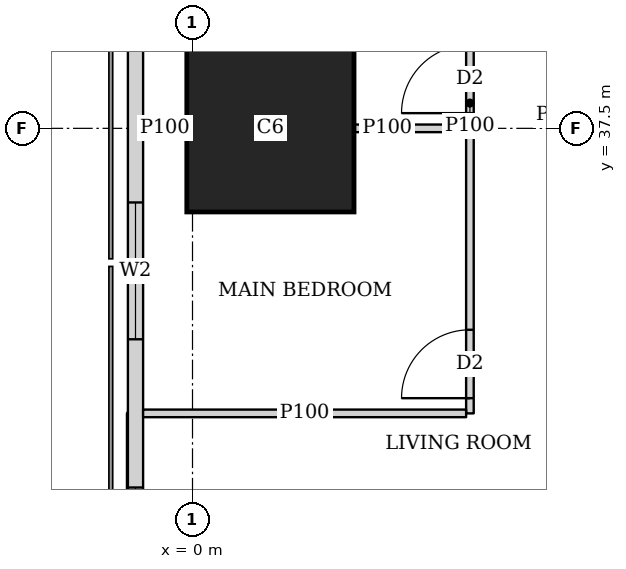
"""IFC4 building model, lengths in metres.
Left out: names, types, materials, properties, quantities, classifications, styles, units other than length and angle.
Written with IfcOpenShell. Run it as: python <this file> out.ifc"""

import sys

from ifc_helpers import new_model, si_unit, direction, frame, frame_2d, origin, origin_2d, place, context, subcontext, project, spatial, rectangle, extrude, element, fill, save


model = new_model("IFC4")
c1 = context("Model", 3, precision=1e-05, world=origin(), true_north=direction((0.0, 1.0)))
c2 = subcontext(c1, "Body", "Model", "MODEL_VIEW")
j1 = project(units=[si_unit("LENGTHUNIT", "METRE"), si_unit("PLANEANGLEUNIT", "RADIAN")], contexts=[c1])
p1 = place(None, origin())
s1 = spatial("IfcSite", under=j1, at=p1, CompositionType="ELEMENT")
p2 = place(p1, origin())
s2 = spatial("IfcBuilding", under=s1, at=p2, CompositionType="ELEMENT")
p3 = place(p2, frame((0.0, 0.0, 126.65)))
s3 = spatial("IfcBuildingStorey", under=s2, at=p3, CompositionType="ELEMENT", Elevation=126.65)
p4 = place(p3, frame((1.025, 37.5, 0.0), z_axis=(0.0, 0.0, 1.0), x_axis=(1.0, 0.0, 0.0)))
e1 = element("IfcColumn", 1, at=p4, inside=s3, PredefinedType="COLUMN", context=c2, shape_type="SweptSolid", body=[
    extrude(rectangle(XDim=2.2, YDim=2.2, at=origin_2d()), origin(), (0.0, 0.0, 1.0), 3.75),
])
p5 = place(p3, frame((-0.75, 42.837, 0.0), z_axis=(0.0, 0.0, 1.0), x_axis=(0.0, -1.0, 0.0)))
e2 = element("IfcWall", 2, at=p5, inside=s3, PredefinedType="SOLIDWALL", context=c2, shape_type="SweptSolid", body=[
    extrude(rectangle(XDim=40.674, YDim=0.2, at=frame_2d((20.337, 0.0))), origin(), (0.0, 0.0, 1.0), 3.45),
])
p6 = place(p5, frame((1.78, 0.0, 0.9)))
e3 = element("IfcOpeningElement", 3, at=p6, cuts=e2, PredefinedType="OPENING", context=c2, shape_type="SweptSolid", body=[
    extrude(rectangle(XDim=1.8, YDim=1.5, at=frame_2d((0.9, 0.75))), frame((0.0, 0.11, 0.0), z_axis=(0.0, -1.0, 0.0), x_axis=(1.0, 0.0, 0.0)), (0.0, 0.0, 1.0), 0.22),
])
p7 = place(p5, frame((6.312, 0.0, 0.9)))
e4 = element("IfcOpeningElement", 4, at=p7, cuts=e2, PredefinedType="OPENING", context=c2, shape_type="SweptSolid", body=[
    extrude(rectangle(XDim=1.8, YDim=1.5, at=frame_2d((0.9, 0.75))), frame((0.0, 0.11, 0.0), z_axis=(0.0, -1.0, 0.0), x_axis=(1.0, 0.0, 0.0)), (0.0, 0.0, 1.0), 0.22),
])
p8 = place(p5, frame((10.062, 0.0, 0.9)))
e5 = element("IfcOpeningElement", 5, at=p8, cuts=e2, PredefinedType="OPENING", context=c2, shape_type="SweptSolid", body=[
    extrude(rectangle(XDim=1.8, YDim=1.5, at=frame_2d((0.9, 0.75))), frame((0.0, 0.11, 0.0), z_axis=(0.0, -1.0, 0.0), x_axis=(1.0, 0.0, 0.0)), (0.0, 0.0, 1.0), 0.22),
])
p9 = place(p5, frame((13.812, 0.0, 0.9)))
e6 = element("IfcOpeningElement", 6, at=p9, cuts=e2, PredefinedType="OPENING", context=c2, shape_type="SweptSolid", body=[
    extrude(rectangle(XDim=1.8, YDim=1.5, at=frame_2d((0.9, 0.75))), frame((0.0, 0.11, 0.0), z_axis=(0.0, -1.0, 0.0), x_axis=(1.0, 0.0, 0.0)), (0.0, 0.0, 1.0), 0.22),
])
p10 = place(p5, frame((17.562, 0.0, 0.9)))
e7 = element("IfcOpeningElement", 7, at=p10, cuts=e2, PredefinedType="OPENING", context=c2, shape_type="SweptSolid", body=[
    extrude(rectangle(XDim=1.8, YDim=1.5, at=frame_2d((0.9, 0.75))), frame((0.0, 0.11, 0.0), z_axis=(0.0, -1.0, 0.0), x_axis=(1.0, 0.0, 0.0)), (0.0, 0.0, 1.0), 0.22),
])
p11 = place(p5, frame((21.312, 0.0, 0.9)))
e8 = element("IfcOpeningElement", 8, at=p11, cuts=e2, PredefinedType="OPENING", context=c2, shape_type="SweptSolid", body=[
    extrude(rectangle(XDim=1.8, YDim=1.5, at=frame_2d((0.9, 0.75))), frame((0.0, 0.11, 0.0), z_axis=(0.0, -1.0, 0.0), x_axis=(1.0, 0.0, 0.0)), (0.0, 0.0, 1.0), 0.22),
])
p12 = place(p5, frame((25.062, 0.0, 0.9)))
e9 = element("IfcOpeningElement", 9, at=p12, cuts=e2, PredefinedType="OPENING", context=c2, shape_type="SweptSolid", body=[
    extrude(rectangle(XDim=1.8, YDim=1.5, at=frame_2d((0.9, 0.75))), frame((0.0, 0.11, 0.0), z_axis=(0.0, -1.0, 0.0), x_axis=(1.0, 0.0, 0.0)), (0.0, 0.0, 1.0), 0.22),
])
p13 = place(p5, frame((28.812, 0.0, 0.9)))
e10 = element("IfcOpeningElement", 10, at=p13, cuts=e2, PredefinedType="OPENING", context=c2, shape_type="SweptSolid", body=[
    extrude(rectangle(XDim=1.8, YDim=1.5, at=frame_2d((0.9, 0.75))), frame((0.0, 0.11, 0.0), z_axis=(0.0, -1.0, 0.0), x_axis=(1.0, 0.0, 0.0)), (0.0, 0.0, 1.0), 0.22),
])
p14 = place(p5, frame((32.562, 0.0, 0.9)))
e11 = element("IfcOpeningElement", 11, at=p14, cuts=e2, PredefinedType="OPENING", context=c2, shape_type="SweptSolid", body=[
    extrude(rectangle(XDim=1.8, YDim=1.5, at=frame_2d((0.9, 0.75))), frame((0.0, 0.11, 0.0), z_axis=(0.0, -1.0, 0.0), x_axis=(1.0, 0.0, 0.0)), (0.0, 0.0, 1.0), 0.22),
])
p15 = place(p5, frame((37.094, 0.0, 0.9)))
e12 = element("IfcOpeningElement", 12, at=p15, cuts=e2, PredefinedType="OPENING", context=c2, shape_type="SweptSolid", body=[
    extrude(rectangle(XDim=1.8, YDim=1.5, at=frame_2d((0.9, 0.75))), frame((0.0, 0.11, 0.0), z_axis=(0.0, -1.0, 0.0), x_axis=(1.0, 0.0, 0.0)), (0.0, 0.0, 1.0), 0.22),
])
p16 = place(p3, frame((3.65, 33.75, 0.0), z_axis=(0.0, 0.0, 1.0), x_axis=(0.0, 1.0, 0.0)))
e13 = element("IfcWall", 13, at=p16, inside=s3, PredefinedType="PARTITIONING", context=c2, shape_type="SweptSolid", body=[
    extrude(rectangle(XDim=8.165, YDim=0.1, at=frame_2d((4.083, 0.0))), origin(), (0.0, 0.0, 1.0), 3.45),
])
p17 = place(p16, frame((0.2, 0.0, 0.0)))
e14 = element("IfcOpeningElement", 14, at=p17, cuts=e13, PredefinedType="OPENING", context=c2, shape_type="SweptSolid", body=[
    extrude(rectangle(XDim=0.9, YDim=2.1, at=frame_2d((0.45, 1.05))), frame((0.0, 0.06, 0.0), z_axis=(0.0, -1.0, 0.0), x_axis=(1.0, 0.0, 0.0)), (0.0, 0.0, 1.0), 0.12),
])
p18 = place(p16, frame((3.95, 0.0, 0.0)))
e15 = element("IfcOpeningElement", 15, at=p18, cuts=e13, PredefinedType="OPENING", context=c2, shape_type="SweptSolid", body=[
    extrude(rectangle(XDim=0.9, YDim=2.1, at=frame_2d((0.45, 1.05))), frame((0.0, 0.06, 0.0), z_axis=(0.0, -1.0, 0.0), x_axis=(1.0, 0.0, 0.0)), (0.0, 0.0, 1.0), 0.12),
])
p19 = place(p3, frame((-0.65, 33.75, 0.0), z_axis=(0.0, 0.0, 1.0), x_axis=(1.0, 0.0, 0.0)))
e16 = element("IfcWall", 16, at=p19, inside=s3, PredefinedType="PARTITIONING", context=c2, shape_type="SweptSolid", body=[
    extrude(rectangle(XDim=4.25, YDim=0.1, at=frame_2d((2.125, 0.0))), origin(), (0.0, 0.0, 1.0), 2.15),
])
p20 = place(p3, frame((-0.65, 37.5, 0.0), z_axis=(0.0, 0.0, 1.0), x_axis=(1.0, 0.0, 0.0)))
e17 = element("IfcWall", 17, at=p20, inside=s3, PredefinedType="PARTITIONING", context=c2, shape_type="SweptSolid", body=[
    extrude(rectangle(XDim=0.574, YDim=0.1, at=frame_2d((0.287, 0.0))), origin(), (0.0, 0.0, 1.0), 2.0),
])
p21 = place(p3, frame((2.126, 37.5, 0.0), z_axis=(0.0, 0.0, 1.0), x_axis=(1.0, 0.0, 0.0)))
e18 = element("IfcWall", 18, at=p21, inside=s3, PredefinedType="PARTITIONING", context=c2, shape_type="SweptSolid", body=[
    extrude(rectangle(XDim=1.474, YDim=0.1, at=frame_2d((0.737, 0.0))), origin(), (0.0, 0.0, 1.0), 2.0),
])
p22 = place(p7, origin())
e19 = element("IfcWindow", 19, at=p22, inside=s3, PartitioningType="SINGLE_PANEL", PredefinedType="WINDOW", context=c2, shape_type="SweptSolid", body=[
    extrude(rectangle(XDim=1.8, YDim=1.5, at=frame_2d((0.9, 0.75))), frame((0.0, 0.03, 0.0), z_axis=(0.0, -1.0, 0.0), x_axis=(1.0, 0.0, 0.0)), (0.0, 0.0, 1.0), 0.06),
])
fill(e4, e19)
p23 = place(p8, origin())
e20 = element("IfcWindow", 20, at=p23, inside=s3, PartitioningType="SINGLE_PANEL", PredefinedType="WINDOW", context=c2, shape_type="SweptSolid", body=[
    extrude(rectangle(XDim=1.8, YDim=1.5, at=frame_2d((0.9, 0.75))), frame((0.0, 0.03, 0.0), z_axis=(0.0, -1.0, 0.0), x_axis=(1.0, 0.0, 0.0)), (0.0, 0.0, 1.0), 0.06),
])
fill(e5, e20)
p24 = place(p17, origin())
e21 = element("IfcDoor", 21, at=p24, inside=s3, OperationType="SINGLE_SWING_LEFT", PredefinedType="DOOR", context=c2, shape_type="SweptSolid", body=[
    extrude(rectangle(XDim=0.9, YDim=2.1, at=frame_2d((0.45, 1.05))), frame((0.0, 0.025, 0.0), z_axis=(0.0, -1.0, 0.0), x_axis=(1.0, 0.0, 0.0)), (0.0, 0.0, 1.0), 0.05),
])
fill(e14, e21)
p25 = place(p18, origin())
e22 = element("IfcDoor", 22, at=p25, inside=s3, OperationType="SINGLE_SWING_LEFT", PredefinedType="DOOR", context=c2, shape_type="SweptSolid", body=[
    extrude(rectangle(XDim=0.9, YDim=2.1, at=frame_2d((0.45, 1.05))), frame((0.0, 0.025, 0.0), z_axis=(0.0, -1.0, 0.0), x_axis=(1.0, 0.0, 0.0)), (0.0, 0.0, 1.0), 0.05),
])
fill(e15, e22)
save(model, sys.argv[1])
